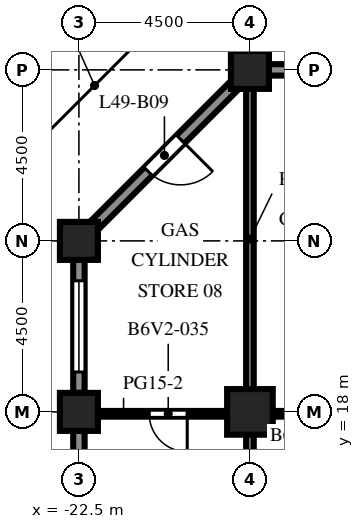
"""IFC4 building model, lengths in metres.
Left out: names, types, materials, properties, quantities, classifications, styles, units other than length and angle.
Written with IfcOpenShell. Run it as: python <this file> out.ifc"""

import sys

from ifc_helpers import new_model, si_unit, direction, frame, frame_2d, origin, origin_2d, place, context, subcontext, project, spatial, rectangle, extrude, element, fill, save


model = new_model("IFC4")
c1 = context("Model", 3, precision=1e-05, world=origin(), true_north=direction((0.0, 1.0)))
c2 = subcontext(c1, "Body", "Model", "MODEL_VIEW")
j1 = project(units=[si_unit("LENGTHUNIT", "METRE"), si_unit("PLANEANGLEUNIT", "RADIAN")], contexts=[c1])
p1 = place(None, origin())
s1 = spatial("IfcSite", under=j1, at=p1, CompositionType="ELEMENT")
p2 = place(p1, origin())
s2 = spatial("IfcBuilding", under=s1, at=p2, CompositionType="ELEMENT")
p3 = place(p2, frame((0.0, 0.0, 216.1)))
s3 = spatial("IfcBuildingStorey", under=s2, at=p3, CompositionType="ELEMENT", Elevation=216.1)
for number, where, z_axis, x_axis in (
    (1, (-22.5, 18.0, 0.0), (0.0, 0.0, 1.0), (1.0, 0.0, 0.0)),
    (2, (-22.5, 22.5, 0.0), (0.0, 0.0, 1.0), (1.0, 0.0, 0.0)),
    (3, (-18.0, 27.0, 0.0), (0.0, 0.0, 1.0), (1.0, 0.0, 0.0)),
):
    element("IfcColumn", number, at=place(p3, frame(where, z_axis=z_axis, x_axis=x_axis)), inside=s3, PredefinedType="COLUMN", context=c2, shape_type="SweptSolid", body=[
        extrude(rectangle(XDim=1.0, YDim=1.0, at=origin_2d()), origin(), (0.0, 0.0, 1.0), 4.1),
    ])
p4 = place(p3, frame((-18.0, 18.0, 0.0), z_axis=(0.0, 0.0, 1.0), x_axis=(1.0, 0.0, 0.0)))
e4 = element("IfcColumn", 4, at=p4, inside=s3, PredefinedType="COLUMN", context=c2, shape_type="SweptSolid", body=[
    extrude(rectangle(XDim=1.2, YDim=1.2, at=origin_2d()), origin(), (0.0, 0.0, 1.0), 4.1),
])
p5 = place(p3, frame((-17.5, 27.0, 0.0), z_axis=(0.0, 0.0, 1.0), x_axis=(1.0, 0.0, 0.0)))
e5 = element("IfcWall", 5, at=p5, inside=s3, PredefinedType="SOLIDWALL", context=c2, shape_type="SweptSolid", body=[
    extrude(rectangle(XDim=3.5, YDim=0.3, at=frame_2d((1.75, 0.0))), origin(), (0.0, 0.0, 1.0), 2.7),
])
p6 = place(p5, frame((0.55, 0.0, 0.8)))
e6 = element("IfcOpeningElement", 6, at=p6, cuts=e5, PredefinedType="OPENING", context=c2, shape_type="SweptSolid", body=[
    extrude(rectangle(XDim=2.4, YDim=1.7, at=frame_2d((1.2, 0.85))), frame((0.0, 0.16, 0.0), z_axis=(0.0, -1.0, 0.0), x_axis=(1.0, 0.0, 0.0)), (0.0, 0.0, 1.0), 0.32),
])
p7 = place(p3, frame((-22.106, 22.894, 0.0), z_axis=(0.0, 0.0, 1.0), x_axis=(0.707106781187, 0.707106781187, 0.0)))
e7 = element("IfcWall", 7, at=p7, inside=s3, PredefinedType="SOLIDWALL", context=c2, shape_type="SweptSolid", body=[
    extrude(rectangle(XDim=5.25, YDim=0.3, at=frame_2d((2.625, 0.0))), origin(), (0.0, 0.0, 1.0), 2.7),
])
p8 = place(p7, frame((2.025, 0.0, 0.0)))
e8 = element("IfcOpeningElement", 8, at=p8, cuts=e7, PredefinedType="OPENING", context=c2, shape_type="SweptSolid", body=[
    extrude(rectangle(XDim=1.2, YDim=2.2, at=frame_2d((0.6, 1.1))), frame((0.0, 0.16, 0.0), z_axis=(0.0, -1.0, 0.0), x_axis=(1.0, 0.0, 0.0)), (0.0, 0.0, 1.0), 0.32),
])
p9 = place(p3, frame((-22.5, 18.5, 0.0), z_axis=(0.0, 0.0, 1.0), x_axis=(0.0, 1.0, 0.0)))
e9 = element("IfcWall", 9, at=p9, inside=s3, PredefinedType="SOLIDWALL", context=c2, shape_type="SweptSolid", body=[
    extrude(rectangle(XDim=3.5, YDim=0.3, at=frame_2d((1.75, 0.0))), origin(), (0.0, 0.0, 1.0), 2.7),
])
p10 = place(p9, frame((0.55, 0.0, 0.8)))
e10 = element("IfcOpeningElement", 10, at=p10, cuts=e9, PredefinedType="OPENING", context=c2, shape_type="SweptSolid", body=[
    extrude(rectangle(XDim=2.4, YDim=1.7, at=frame_2d((1.2, 0.85))), frame((0.0, 0.16, 0.0), z_axis=(0.0, -1.0, 0.0), x_axis=(1.0, 0.0, 0.0)), (0.0, 0.0, 1.0), 0.32),
])
p11 = place(p3, frame((-22.5, 14.0, 0.0), z_axis=(0.0, 0.0, 1.0), x_axis=(0.0, 1.0, 0.0)))
e11 = element("IfcWall", 11, at=p11, inside=s3, PredefinedType="SOLIDWALL", context=c2, shape_type="SweptSolid", body=[
    extrude(rectangle(XDim=3.5, YDim=0.3, at=frame_2d((1.75, 0.0))), origin(), (0.0, 0.0, 1.0), 2.7),
])
p12 = place(p11, frame((1.25, 0.0, 0.0)))
e12 = element("IfcOpeningElement", 12, at=p12, cuts=e11, PredefinedType="OPENING", context=c2, shape_type="SweptSolid", body=[
    extrude(rectangle(XDim=1.0, YDim=2.2, at=frame_2d((0.5, 1.1))), frame((0.0, 0.16, 0.0), z_axis=(0.0, -1.0, 0.0), x_axis=(1.0, 0.0, 0.0)), (0.0, 0.0, 1.0), 0.32),
])
p13 = place(p3, frame((-18.0, 9.6, 0.0), z_axis=(0.0, 0.0, 1.0), x_axis=(0.0, 1.0, 0.0)))
e13 = element("IfcWall", 13, at=p13, inside=s3, PredefinedType="PARTITIONING", context=c2, shape_type="SweptSolid", body=[
    extrude(rectangle(XDim=7.8, YDim=0.2, at=frame_2d((3.9, 0.0))), origin(), (0.0, 0.0, 1.0), 3.5),
])
p14 = place(p3, frame((-18.0, 18.6, 0.0), z_axis=(0.0, 0.0, 1.0), x_axis=(0.0, 1.0, 0.0)))
e14 = element("IfcWall", 14, at=p14, inside=s3, PredefinedType="PARTITIONING", context=c2, shape_type="SweptSolid", body=[
    extrude(rectangle(XDim=7.9, YDim=0.2, at=frame_2d((3.95, 0.0))), origin(), (0.0, 0.0, 1.0), 3.5),
])
p15 = place(p3, frame((-22.0, 17.95, 0.0), z_axis=(0.0, 0.0, 1.0), x_axis=(1.0, 0.0, 0.0)))
e15 = element("IfcWall", 15, at=p15, inside=s3, PredefinedType="PARTITIONING", context=c2, shape_type="SweptSolid", body=[
    extrude(rectangle(XDim=3.4, YDim=0.15, at=frame_2d((1.7, 0.0))), origin(), (0.0, 0.0, 1.0), 3.5),
])
p16 = place(p15, frame((1.35, 0.0, 0.0)))
e16 = element("IfcOpeningElement", 16, at=p16, cuts=e15, PredefinedType="OPENING", context=c2, shape_type="SweptSolid", body=[
    extrude(rectangle(XDim=1.0, YDim=2.1, at=frame_2d((0.5, 1.05))), frame((0.0, 0.085, 0.0), z_axis=(0.0, -1.0, 0.0), x_axis=(1.0, 0.0, 0.0)), (0.0, 0.0, 1.0), 0.17),
])
p17 = place(p3, frame((-17.4, 17.95, 0.0), z_axis=(0.0, 0.0, 1.0), x_axis=(1.0, 0.0, 0.0)))
e17 = element("IfcWall", 17, at=p17, inside=s3, PredefinedType="PARTITIONING", context=c2, shape_type="SweptSolid", body=[
    extrude(rectangle(XDim=3.9, YDim=0.15, at=frame_2d((1.95, 0.0))), origin(), (0.0, 0.0, 1.0), 3.5),
])
p18 = place(p17, frame((0.5, 0.0, 0.0)))
e18 = element("IfcOpeningElement", 18, at=p18, cuts=e17, PredefinedType="OPENING", context=c2, shape_type="SweptSolid", body=[
    extrude(rectangle(XDim=1.0, YDim=2.1, at=frame_2d((0.5, 1.05))), frame((0.0, 0.085, 0.0), z_axis=(0.0, -1.0, 0.0), x_axis=(1.0, 0.0, 0.0)), (0.0, 0.0, 1.0), 0.17),
])
p19 = place(p8, origin())
e19 = element("IfcDoor", 19, at=p19, inside=s3, OperationType="SINGLE_SWING_RIGHT", PredefinedType="DOOR", context=c2, shape_type="SweptSolid", body=[
    extrude(rectangle(XDim=1.2, YDim=2.2, at=frame_2d((0.6, 1.1))), frame((0.0, 0.025, 0.0), z_axis=(0.0, -1.0, 0.0), x_axis=(1.0, 0.0, 0.0)), (0.0, 0.0, 1.0), 0.05),
])
fill(e8, e19)
p20 = place(p10, origin())
e20 = element("IfcWindow", 20, at=p20, inside=s3, PartitioningType="SINGLE_PANEL", PredefinedType="WINDOW", context=c2, shape_type="SweptSolid", body=[
    extrude(rectangle(XDim=2.4, YDim=1.7, at=frame_2d((1.2, 0.85))), frame((0.0, 0.03, 0.0), z_axis=(0.0, -1.0, 0.0), x_axis=(1.0, 0.0, 0.0)), (0.0, 0.0, 1.0), 0.06),
])
fill(e10, e20)
p21 = place(p16, origin())
e21 = element("IfcDoor", 21, at=p21, inside=s3, OperationType="SINGLE_SWING_RIGHT", PredefinedType="DOOR", context=c2, shape_type="SweptSolid", body=[
    extrude(rectangle(XDim=1.0, YDim=2.1, at=frame_2d((0.5, 1.05))), frame((0.0, 0.025, 0.0), z_axis=(0.0, -1.0, 0.0), x_axis=(1.0, 0.0, 0.0)), (0.0, 0.0, 1.0), 0.05),
])
fill(e16, e21)
save(model, sys.argv[1])
